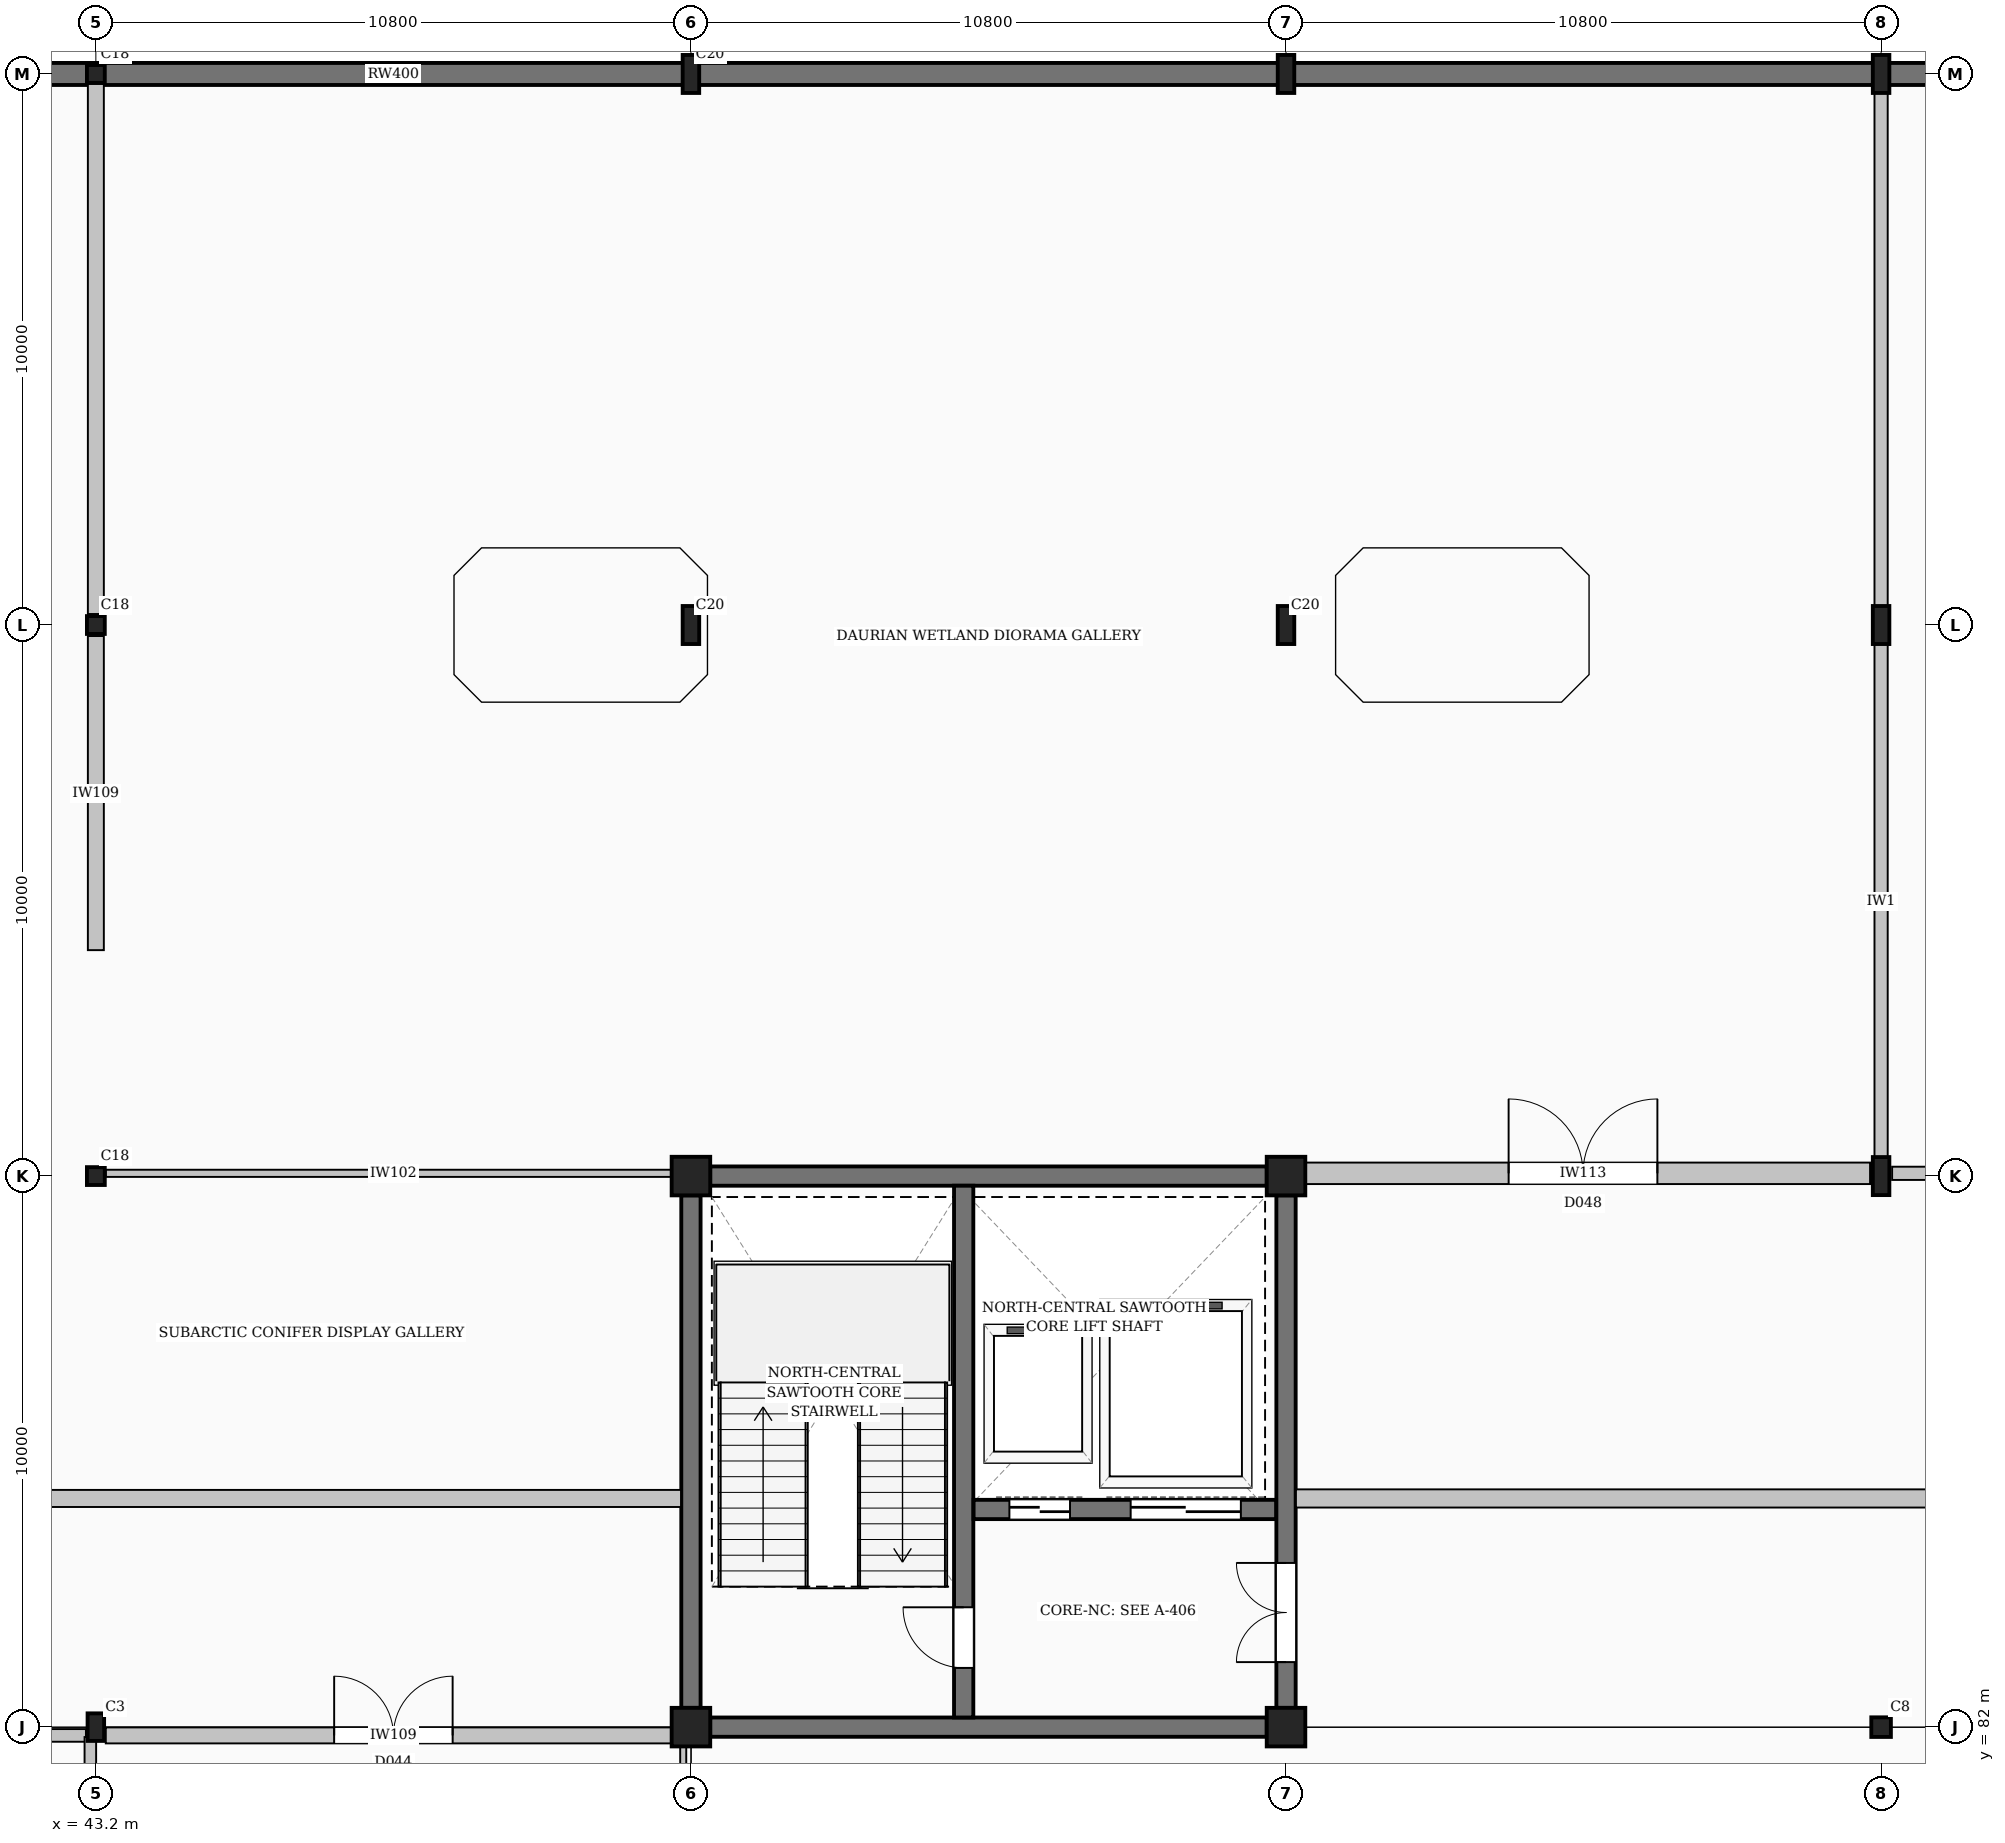
"""IFC4 building model, lengths in metres.
Left out: names, types, materials, properties, quantities, classifications, styles, units other than length and angle.
Written with IfcOpenShell. Run it as: python <this file> out.ifc"""

import sys

from ifc_helpers import new_model, si_unit, direction, frame, frame_2d, origin, origin_2d, place, context, subcontext, project, spatial, rectangle, hollow_circle, i_section, extrude, element, fill, save


model = new_model("IFC4")
c1 = context("Model", 3, precision=1e-05, world=origin(), true_north=direction((0.0, 1.0)))
c2 = subcontext(c1, "Body", "Model", "MODEL_VIEW")
j1 = project(units=[si_unit("LENGTHUNIT", "METRE"), si_unit("PLANEANGLEUNIT", "RADIAN")], contexts=[c1])
p1 = place(None, origin())
s1 = spatial("IfcSite", under=j1, at=p1, CompositionType="ELEMENT")
p2 = place(p1, origin())
s2 = spatial("IfcBuilding", under=s1, at=p2, CompositionType="ELEMENT")
p3 = place(p2, frame((0.0, 0.0, 4.8)))
s3 = spatial("IfcBuildingStorey", under=s2, at=p3, CompositionType="ELEMENT", Elevation=4.8)
p4 = place(p3, frame((32.4, 112.0, 0.0), z_axis=(0.0, 0.0, 1.0), x_axis=(1.0, 0.0, 0.0)))
e1 = element("IfcWall", 1, at=p4, inside=s3, PredefinedType="USERDEFINED", context=c2, shape_type="SweptSolid", body=[
    extrude(rectangle(XDim=32.4, YDim=0.4, at=frame_2d((16.2, 0.0))), origin(), (0.0, 0.0, 1.0), 4.56),
])
p5 = place(p3, frame((64.8, 112.0, 0.0), z_axis=(0.0, 0.0, 1.0), x_axis=(1.0, 0.0, 0.0)))
e2 = element("IfcWall", 2, at=p5, inside=s3, PredefinedType="USERDEFINED", context=c2, shape_type="SweptSolid", body=[
    extrude(rectangle(XDim=43.42, YDim=0.4, at=frame_2d((21.71, 0.0))), origin(), (0.0, 0.0, 1.0), 4.56),
])
p6 = place(p3, frame((43.2, 82.0, 0.0), z_axis=(0.0, 0.0, 1.0), x_axis=(1.0, 0.0, 0.0)))
e3 = element("IfcColumn", 3, at=p6, inside=s3, PredefinedType="COLUMN", context=c2, shape_type="SweptSolid", body=[
    extrude(i_section(OverallWidth=0.3, OverallDepth=0.5, WebThickness=0.014, FlangeThickness=0.028, FilletRadius=0.027, at=origin_2d()), origin(), (0.0, 0.0, 1.0), 4.8),
])
for number, where, z_axis, x_axis in (
    (4, (43.2, 92.0, 0.0), (0.0, 0.0, 1.0), (1.0, 0.0, 0.0)),
    (5, (43.2, 102.0, 0.0), (0.0, 0.0, 1.0), (1.0, 0.0, 0.0)),
    (6, (43.2, 112.0, 0.0), (0.0, 0.0, 1.0), (1.0, 0.0, 0.0)),
):
    element("IfcColumn", number, at=place(p3, frame(where, z_axis=z_axis, x_axis=x_axis)), inside=s3, PredefinedType="COLUMN", context=c2, shape_type="SweptSolid", body=[
        extrude(hollow_circle(Radius=0.162, WallThickness=0.014, at=origin_2d()), origin(), (0.0, 0.0, 1.0), 4.8),
    ])
for number, where, z_axis, x_axis in (
    (7, (54.0, 82.0, 0.0), (0.0, 0.0, 1.0), (1.0, 0.0, 0.0)),
    (8, (54.0, 92.0, 0.0), (0.0, 0.0, 1.0), (1.0, 0.0, 0.0)),
):
    element("IfcColumn", number, at=place(p3, frame(where, z_axis=z_axis, x_axis=x_axis)), inside=s3, PredefinedType="COLUMN", context=c2, shape_type="SweptSolid", body=[
        extrude(rectangle(XDim=0.7, YDim=0.7, at=origin_2d()), origin(), (0.0, 0.0, 1.0), 4.8),
    ])
for number, where, z_axis, x_axis in (
    (9, (54.0, 102.0, 0.0), (0.0, 0.0, 1.0), (1.0, 0.0, 0.0)),
    (10, (54.0, 112.0, 0.0), (0.0, 0.0, 1.0), (1.0, 0.0, 0.0)),
):
    element("IfcColumn", number, at=place(p3, frame(where, z_axis=z_axis, x_axis=x_axis)), inside=s3, PredefinedType="COLUMN", context=c2, shape_type="SweptSolid", body=[
        extrude(i_section(OverallWidth=0.3, OverallDepth=0.69, WebThickness=0.014, FlangeThickness=0.027, FilletRadius=0.027, at=origin_2d()), origin(), (0.0, 0.0, 1.0), 4.8),
    ])
for number, where, z_axis, x_axis in (
    (11, (64.8, 82.0, 0.0), (0.0, 0.0, 1.0), (1.0, 0.0, 0.0)),
    (12, (64.8, 92.0, 0.0), (0.0, 0.0, 1.0), (1.0, 0.0, 0.0)),
):
    element("IfcColumn", number, at=place(p3, frame(where, z_axis=z_axis, x_axis=x_axis)), inside=s3, PredefinedType="COLUMN", context=c2, shape_type="SweptSolid", body=[
        extrude(rectangle(XDim=0.7, YDim=0.7, at=origin_2d()), origin(), (0.0, 0.0, 1.0), 4.8),
    ])
for number, where, z_axis, x_axis in (
    (13, (64.8, 102.0, 0.0), (0.0, 0.0, 1.0), (1.0, 0.0, 0.0)),
    (14, (64.8, 112.0, 0.0), (0.0, 0.0, 1.0), (1.0, 0.0, 0.0)),
):
    element("IfcColumn", number, at=place(p3, frame(where, z_axis=z_axis, x_axis=x_axis)), inside=s3, PredefinedType="COLUMN", context=c2, shape_type="SweptSolid", body=[
        extrude(i_section(OverallWidth=0.3, OverallDepth=0.69, WebThickness=0.014, FlangeThickness=0.027, FilletRadius=0.027, at=origin_2d()), origin(), (0.0, 0.0, 1.0), 4.8),
    ])
p7 = place(p3, frame((75.6, 82.0, 0.0), z_axis=(0.0, 0.0, 1.0), x_axis=(1.0, 0.0, 0.0)))
e15 = element("IfcColumn", 15, at=p7, inside=s3, PredefinedType="COLUMN", context=c2, shape_type="SweptSolid", body=[
    extrude(hollow_circle(Radius=0.178, WallThickness=0.016, at=origin_2d()), origin(), (0.0, 0.0, 1.0), 4.8),
])
for number, where, z_axis, x_axis in (
    (16, (75.6, 92.0, 0.0), (0.0, 0.0, 1.0), (1.0, 0.0, 0.0)),
    (17, (75.6, 102.0, 0.0), (0.0, 0.0, 1.0), (1.0, 0.0, 0.0)),
    (18, (75.6, 112.0, 0.0), (0.0, 0.0, 1.0), (1.0, 0.0, 0.0)),
):
    element("IfcColumn", number, at=place(p3, frame(where, z_axis=z_axis, x_axis=x_axis)), inside=s3, PredefinedType="COLUMN", context=c2, shape_type="SweptSolid", body=[
        extrude(i_section(OverallWidth=0.3, OverallDepth=0.69, WebThickness=0.014, FlangeThickness=0.027, FilletRadius=0.027, at=origin_2d()), origin(), (0.0, 0.0, 1.0), 4.8),
    ])
for number, where, z_axis, x_axis in (
    (19, (54.35, 82.0, 0.0), (0.0, 0.0, 1.0), (1.0, 0.0, 0.0)),
    (20, (54.35, 92.0, 0.0), (0.0, 0.0, 1.0), (1.0, 0.0, 0.0)),
):
    element("IfcWall", number, at=place(p3, frame(where, z_axis=z_axis, x_axis=x_axis)), inside=s3, PredefinedType="SHEAR", context=c2, shape_type="SweptSolid", body=[
        extrude(rectangle(XDim=10.1, YDim=0.35, at=frame_2d((5.05, 0.0))), origin(), (0.0, 0.0, 1.0), 4.56),
    ])
p8 = place(p3, frame((54.0, 82.35, 0.0), z_axis=(0.0, 0.0, 1.0), x_axis=(0.0, 1.0, 0.0)))
e21 = element("IfcWall", 21, at=p8, inside=s3, PredefinedType="SHEAR", context=c2, shape_type="SweptSolid", body=[
    extrude(rectangle(XDim=9.3, YDim=0.35, at=frame_2d((4.65, 0.0))), origin(), (0.0, 0.0, 1.0), 4.56),
])
p9 = place(p3, frame((64.8, 82.35, 0.0), z_axis=(0.0, 0.0, 1.0), x_axis=(0.0, 1.0, 0.0)))
e22 = element("IfcWall", 22, at=p9, inside=s3, PredefinedType="SHEAR", context=c2, shape_type="SweptSolid", body=[
    extrude(rectangle(XDim=9.3, YDim=0.35, at=frame_2d((4.65, 0.0))), origin(), (0.0, 0.0, 1.0), 4.56),
])
p10 = place(p9, frame((0.83, 0.0, 0.0)))
e23 = element("IfcOpeningElement", 23, at=p10, cuts=e22, PredefinedType="OPENING", context=c2, shape_type="SweptSolid", body=[
    extrude(rectangle(XDim=1.8, YDim=2.25, at=frame_2d((0.9, 1.125))), frame((0.0, 0.185, 0.0), z_axis=(0.0, -1.0, 0.0), x_axis=(1.0, 0.0, 0.0)), (0.0, 0.0, 1.0), 0.37),
])
p11 = place(p3, frame((58.95, 82.175, 0.0), z_axis=(0.0, 0.0, 1.0), x_axis=(0.0, 1.0, 0.0)))
e24 = element("IfcWall", 24, at=p11, inside=s3, PredefinedType="SHEAR", context=c2, shape_type="SweptSolid", body=[
    extrude(rectangle(XDim=9.65, YDim=0.35, at=frame_2d((4.825, 0.0))), origin(), (0.0, 0.0, 1.0), 4.56),
])
p12 = place(p11, frame((0.9, 0.0, 0.0)))
e25 = element("IfcOpeningElement", 25, at=p12, cuts=e24, PredefinedType="OPENING", context=c2, shape_type="SweptSolid", body=[
    extrude(rectangle(XDim=1.1, YDim=2.2, at=frame_2d((0.55, 1.1))), frame((0.0, 0.185, 0.0), z_axis=(0.0, -1.0, 0.0), x_axis=(1.0, 0.0, 0.0)), (0.0, 0.0, 1.0), 0.37),
])
p13 = place(p3, frame((59.13, 85.95, 0.0), z_axis=(0.0, 0.0, 1.0), x_axis=(1.0, 0.0, 0.0)))
e26 = element("IfcWall", 26, at=p13, inside=s3, PredefinedType="SHEAR", context=c2, shape_type="SweptSolid", body=[
    extrude(rectangle(XDim=5.49, YDim=0.35, at=frame_2d((2.745, 0.0))), origin(), (0.0, 0.0, 1.0), 4.56),
])
p14 = place(p13, frame((0.65, 0.0, 0.0)))
e27 = element("IfcOpeningElement", 27, at=p14, cuts=e26, PredefinedType="OPENING", context=c2, shape_type="SweptSolid", body=[
    extrude(rectangle(XDim=1.1, YDim=2.2, at=frame_2d((0.55, 1.1))), frame((0.0, 0.185, 0.0), z_axis=(0.0, -1.0, 0.0), x_axis=(1.0, 0.0, 0.0)), (0.0, 0.0, 1.0), 0.37),
])
p15 = place(p13, frame((2.85, 0.0, 0.0)))
e28 = element("IfcOpeningElement", 28, at=p15, cuts=e26, PredefinedType="OPENING", context=c2, shape_type="SweptSolid", body=[
    extrude(rectangle(XDim=2.0, YDim=2.5, at=frame_2d((1.0, 1.25))), frame((0.0, 0.185, 0.0), z_axis=(0.0, -1.0, 0.0), x_axis=(1.0, 0.0, 0.0)), (0.0, 0.0, 1.0), 0.37),
])
p16 = place(p3, frame((32.6, 81.85, 0.0), z_axis=(0.0, 0.0, 1.0), x_axis=(1.0, 0.0, 0.0)))
e29 = element("IfcWall", 29, at=p16, inside=s3, PredefinedType="PARTITIONING", context=c2, shape_type="SweptSolid", body=[
    extrude(rectangle(XDim=10.42, YDim=0.23, at=frame_2d((5.21, 0.0))), origin(), (0.0, 0.0, 1.0), 4.04),
])
p17 = place(p16, frame((4.185, 0.0, 0.0)))
e30 = element("IfcOpeningElement", 30, at=p17, cuts=e29, PredefinedType="OPENING", context=c2, shape_type="SweptSolid", body=[
    extrude(rectangle(XDim=2.05, YDim=2.55, at=frame_2d((1.025, 1.275))), frame((0.0, 0.125, 0.0), z_axis=(0.0, -1.0, 0.0), x_axis=(1.0, 0.0, 0.0)), (0.0, 0.0, 1.0), 0.25),
])
p18 = place(p3, frame((43.38, 81.85, 0.0), z_axis=(0.0, 0.0, 1.0), x_axis=(1.0, 0.0, 0.0)))
e31 = element("IfcWall", 31, at=p18, inside=s3, PredefinedType="PARTITIONING", context=c2, shape_type="SweptSolid", body=[
    extrude(rectangle(XDim=10.44, YDim=0.29, at=frame_2d((5.22, 0.0))), origin(), (0.0, 0.0, 1.0), 4.04),
])
p19 = place(p18, frame((4.145, 0.0, 0.0)))
e32 = element("IfcOpeningElement", 32, at=p19, cuts=e31, PredefinedType="OPENING", context=c2, shape_type="SweptSolid", body=[
    extrude(rectangle(XDim=2.15, YDim=2.6, at=frame_2d((1.075, 1.3))), frame((0.0, 0.155, 0.0), z_axis=(0.0, -1.0, 0.0), x_axis=(1.0, 0.0, 0.0)), (0.0, 0.0, 1.0), 0.31),
])
p20 = place(p3, frame((25.6, 86.15, 0.0), z_axis=(0.0, 0.0, 1.0), x_axis=(1.0, 0.0, 0.0)))
e33 = element("IfcWall", 33, at=p20, inside=s3, PredefinedType="PARTITIONING", context=c2, shape_type="SweptSolid", body=[
    extrude(rectangle(XDim=28.22, YDim=0.31, at=frame_2d((14.11, 0.0))), origin(), (0.0, 0.0, 1.0), 4.52),
])
p21 = place(p20, frame((12.96, 0.0, 0.0)))
e34 = element("IfcOpeningElement", 34, at=p21, cuts=e33, PredefinedType="OPENING", context=c2, shape_type="SweptSolid", body=[
    extrude(rectangle(XDim=2.3, YDim=2.65, at=frame_2d((1.15, 1.325))), frame((0.0, 0.165, 0.0), z_axis=(0.0, -1.0, 0.0), x_axis=(1.0, 0.0, 0.0)), (0.0, 0.0, 1.0), 0.33),
])
p22 = place(p3, frame((64.98, 86.15, 0.0), z_axis=(0.0, 0.0, 1.0), x_axis=(1.0, 0.0, 0.0)))
e35 = element("IfcWall", 35, at=p22, inside=s3, PredefinedType="PARTITIONING", context=c2, shape_type="SweptSolid", body=[
    extrude(rectangle(XDim=42.84, YDim=0.33, at=frame_2d((21.42, 0.0))), origin(), (0.0, 0.0, 1.0), 4.52),
])
p23 = place(p22, frame((20.17, 0.0, 0.0)))
e36 = element("IfcOpeningElement", 36, at=p23, cuts=e35, PredefinedType="OPENING", context=c2, shape_type="SweptSolid", body=[
    extrude(rectangle(XDim=2.5, YDim=2.75, at=frame_2d((1.25, 1.375))), frame((0.0, 0.175, 0.0), z_axis=(0.0, -1.0, 0.0), x_axis=(1.0, 0.0, 0.0)), (0.0, 0.0, 1.0), 0.35),
])
p24 = place(p3, frame((64.98, 92.05, 0.0), z_axis=(0.0, 0.0, 1.0), x_axis=(1.0, 0.0, 0.0)))
e37 = element("IfcWall", 37, at=p24, inside=s3, PredefinedType="PARTITIONING", context=c2, shape_type="SweptSolid", body=[
    extrude(rectangle(XDim=10.42, YDim=0.39, at=frame_2d((5.21, 0.0))), origin(), (0.0, 0.0, 1.0), 4.069),
])
p25 = place(p24, frame((3.86, 0.0, 0.0)))
e38 = element("IfcOpeningElement", 38, at=p25, cuts=e37, PredefinedType="OPENING", context=c2, shape_type="SweptSolid", body=[
    extrude(rectangle(XDim=2.7, YDim=2.85, at=frame_2d((1.35, 1.425))), frame((0.0, 0.205, 0.0), z_axis=(0.0, -1.0, 0.0), x_axis=(1.0, 0.0, 0.0)), (0.0, 0.0, 1.0), 0.41),
])
p26 = place(p3, frame((75.8, 92.05, 0.0), z_axis=(0.0, 0.0, 1.0), x_axis=(1.0, 0.0, 0.0)))
e39 = element("IfcWall", 39, at=p26, inside=s3, PredefinedType="SOLIDWALL", context=c2, shape_type="SweptSolid", body=[
    extrude(rectangle(XDim=10.4, YDim=0.24, at=frame_2d((5.2, 0.0))), origin(), (0.0, 0.0, 1.0), 4.069),
])
p27 = place(p3, frame((43.38, 92.05, 0.0), z_axis=(0.0, 0.0, 1.0), x_axis=(1.0, 0.0, 0.0)))
e40 = element("IfcWall", 40, at=p27, inside=s3, PredefinedType="PARTITIONING", context=c2, shape_type="SweptSolid", body=[
    extrude(rectangle(XDim=10.44, YDim=0.13, at=frame_2d((5.22, 0.0))), origin(), (0.0, 0.0, 1.0), 4.069),
])
p28 = place(p3, frame((43.1, 72.2, 0.0), z_axis=(0.0, 0.0, 1.0), x_axis=(0.0, 1.0, 0.0)))
e41 = element("IfcWall", 41, at=p28, inside=s3, PredefinedType="PARTITIONING", context=c2, shape_type="SweptSolid", body=[
    extrude(rectangle(XDim=9.62, YDim=0.21, at=frame_2d((4.81, 0.0))), origin(), (0.0, 0.0, 1.0), 4.04),
])
p29 = place(p3, frame((43.2, 96.1, 0.0), z_axis=(0.0, 0.0, 1.0), x_axis=(0.0, 1.0, 0.0)))
e42 = element("IfcWall", 42, at=p29, inside=s3, PredefinedType="PARTITIONING", context=c2, shape_type="SweptSolid", body=[
    extrude(rectangle(XDim=5.7, YDim=0.29, at=frame_2d((2.85, 0.0))), origin(), (0.0, 0.0, 1.0), 4.06),
])
p30 = place(p3, frame((43.2, 102.2, 0.0), z_axis=(0.0, 0.0, 1.0), x_axis=(0.0, 1.0, 0.0)))
e43 = element("IfcWall", 43, at=p30, inside=s3, PredefinedType="PARTITIONING", context=c2, shape_type="SweptSolid", body=[
    extrude(rectangle(XDim=9.62, YDim=0.29, at=frame_2d((4.81, 0.0))), origin(), (0.0, 0.0, 1.0), 4.06),
])
p31 = place(p3, frame((53.86, 72.2, 0.0), z_axis=(0.0, 0.0, 1.0), x_axis=(0.0, 1.0, 0.0)))
e44 = element("IfcWall", 44, at=p31, inside=s3, PredefinedType="PARTITIONING", context=c2, shape_type="SweptSolid", body=[
    extrude(rectangle(XDim=9.62, YDim=0.11, at=frame_2d((4.81, 0.0))), origin(), (0.0, 0.0, 1.0), 4.52),
])
for number, where, z_axis, x_axis in (
    (45, (75.6, 92.18, 0.0), (0.0, 0.0, 1.0), (0.0, 1.0, 0.0)),
    (46, (75.6, 102.2, 0.0), (0.0, 0.0, 1.0), (0.0, 1.0, 0.0)),
):
    element("IfcWall", number, at=place(p3, frame(where, z_axis=z_axis, x_axis=x_axis)), inside=s3, PredefinedType="SOLIDWALL", context=c2, shape_type="SweptSolid", body=[
        extrude(rectangle(XDim=9.62, YDim=0.24, at=frame_2d((4.81, 0.0))), origin(), (0.0, 0.0, 1.0), 4.06),
    ])
p32 = place(p12, origin())
e47 = element("IfcDoor", 47, at=p32, inside=s3, OperationType="SINGLE_SWING_RIGHT", PredefinedType="DOOR", context=c2, shape_type="SweptSolid", body=[
    extrude(rectangle(XDim=1.1, YDim=2.2, at=frame_2d((0.55, 1.1))), frame((0.0, 0.025, 0.0), z_axis=(0.0, -1.0, 0.0), x_axis=(1.0, 0.0, 0.0)), (0.0, 0.0, 1.0), 0.05),
])
fill(e25, e47)
p33 = place(p10, origin())
e48 = element("IfcDoor", 48, at=p33, inside=s3, OperationType="DOUBLE_DOOR_SINGLE_SWING", PredefinedType="DOOR", context=c2, shape_type="SweptSolid", body=[
    extrude(rectangle(XDim=1.8, YDim=2.25, at=frame_2d((0.9, 1.125))), frame((0.0, 0.025, 0.0), z_axis=(0.0, -1.0, 0.0), x_axis=(1.0, 0.0, 0.0)), (0.0, 0.0, 1.0), 0.05),
])
fill(e23, e48)
p34 = place(p14, origin())
e49 = element("IfcDoor", 49, at=p34, inside=s3, OperationType="DOUBLE_DOOR_SLIDING", PredefinedType="DOOR", context=c2, shape_type="SweptSolid", body=[
    extrude(rectangle(XDim=1.1, YDim=2.2, at=frame_2d((0.55, 1.1))), frame((0.0, 0.025, 0.0), z_axis=(0.0, -1.0, 0.0), x_axis=(1.0, 0.0, 0.0)), (0.0, 0.0, 1.0), 0.05),
])
fill(e27, e49)
p35 = place(p15, origin())
e50 = element("IfcDoor", 50, at=p35, inside=s3, OperationType="DOUBLE_DOOR_SLIDING", PredefinedType="DOOR", context=c2, shape_type="SweptSolid", body=[
    extrude(rectangle(XDim=2.0, YDim=2.5, at=frame_2d((1.0, 1.25))), frame((0.0, 0.025, 0.0), z_axis=(0.0, -1.0, 0.0), x_axis=(1.0, 0.0, 0.0)), (0.0, 0.0, 1.0), 0.05),
])
fill(e28, e50)
p36 = place(p19, origin())
e51 = element("IfcDoor", 51, at=p36, inside=s3, OperationType="DOUBLE_DOOR_SINGLE_SWING", PredefinedType="DOOR", context=c2, shape_type="SweptSolid", body=[
    extrude(rectangle(XDim=2.15, YDim=2.6, at=frame_2d((1.075, 1.3))), frame((0.0, 0.025, 0.0), z_axis=(0.0, -1.0, 0.0), x_axis=(1.0, 0.0, 0.0)), (0.0, 0.0, 1.0), 0.05),
])
fill(e32, e51)
p37 = place(p25, origin())
e52 = element("IfcDoor", 52, at=p37, inside=s3, OperationType="DOUBLE_DOOR_SINGLE_SWING", PredefinedType="DOOR", context=c2, shape_type="SweptSolid", body=[
    extrude(rectangle(XDim=2.7, YDim=2.85, at=frame_2d((1.35, 1.425))), frame((0.0, 0.025, 0.0), z_axis=(0.0, -1.0, 0.0), x_axis=(1.0, 0.0, 0.0)), (0.0, 0.0, 1.0), 0.05),
])
fill(e38, e52)
save(model, sys.argv[1])
